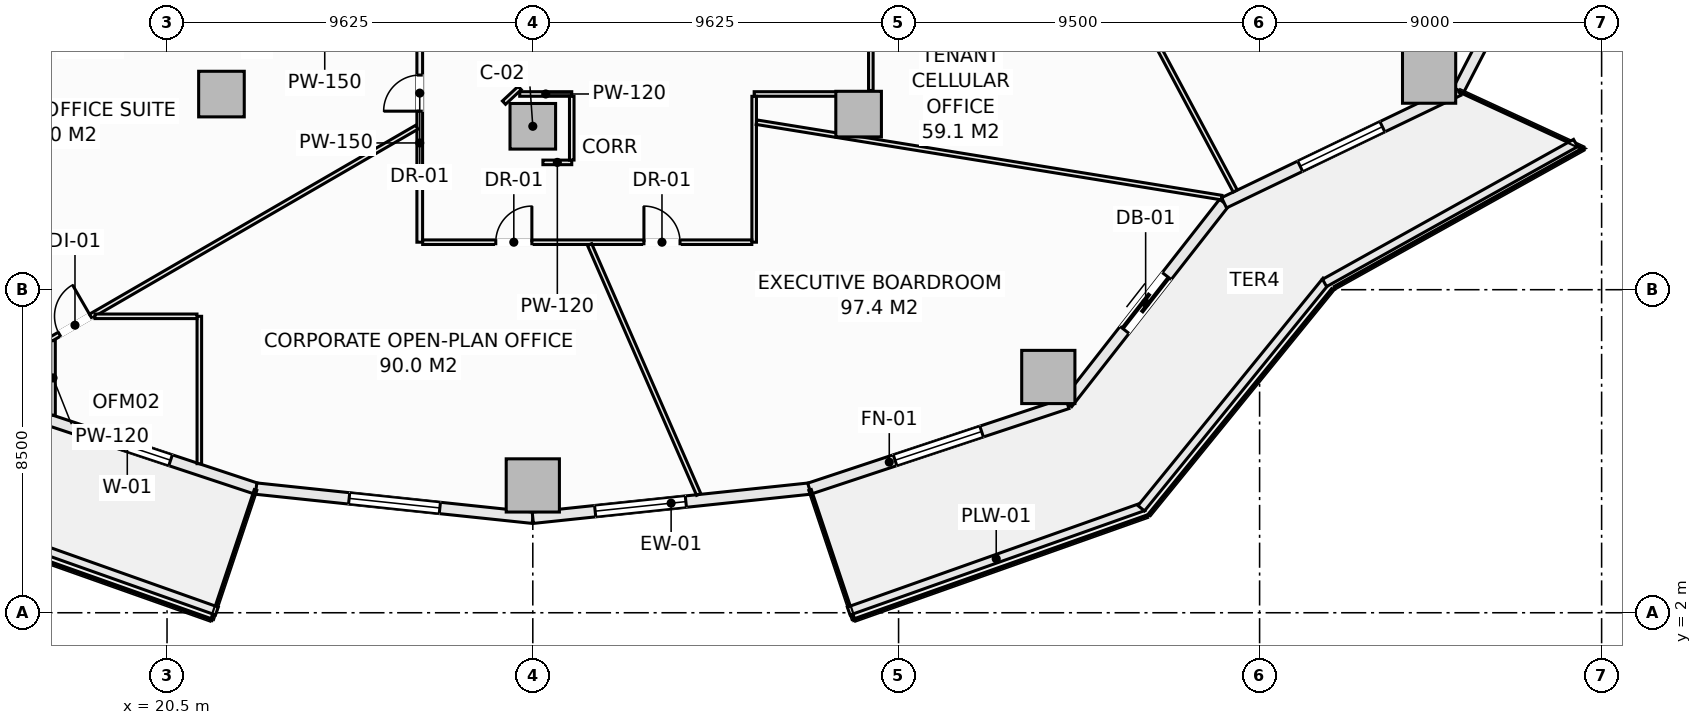
"""IFC4 building model, lengths in metres.
Left out: names, types, materials, properties, quantities, classifications, styles, units other than length and angle.
Written with IfcOpenShell. Run it as: python <this file> out.ifc"""

import sys

from ifc_helpers import new_model, si_unit, direction, frame, frame_2d, origin, origin_2d, place, context, subcontext, project, spatial, rectangle, extrude, element, fill, save


model = new_model("IFC4")
c1 = context("Model", 3, precision=1e-05, world=origin(), true_north=direction((0.0, 1.0)))
c2 = subcontext(c1, "Body", "Model", "MODEL_VIEW")
j1 = project(units=[si_unit("LENGTHUNIT", "METRE"), si_unit("PLANEANGLEUNIT", "RADIAN")], contexts=[c1])
p1 = place(None, origin())
s1 = spatial("IfcSite", under=j1, at=p1, CompositionType="ELEMENT")
p2 = place(p1, origin())
s2 = spatial("IfcBuilding", under=s1, at=p2, CompositionType="ELEMENT")
p3 = place(p2, frame((0.0, 0.0, 26.5)))
s3 = spatial("IfcBuildingStorey", under=s2, at=p3, CompositionType="ELEMENT", Elevation=26.5)
for number, where, z_axis, x_axis in (
    (1, (30.125, 5.35, -0.28), (0.0, 0.0, 1.0), (1.0, 0.0, 0.0)),
    (2, (43.69, 8.204, -0.28), (0.0, 0.0, 1.0), (1.0, 0.0, 0.0)),
    (3, (53.71, 16.106, -0.28), (0.0, 0.0, 1.0), (1.0, 0.0, 0.0)),
):
    element("IfcColumn", number, at=place(p3, frame(where, z_axis=z_axis, x_axis=x_axis)), inside=s3, PredefinedType="COLUMN", context=c2, shape_type="SweptSolid", body=[
        extrude(rectangle(XDim=1.4, YDim=1.4, at=origin_2d()), origin(), (0.0, 0.0, 1.0), 3.85),
    ])
for number, where, z_axis, x_axis in (
    (4, (21.932, 15.648, -0.28), (0.0, 0.0, 1.0), (1.0, 0.0, 0.0)),
    (5, (30.125, 14.8, -0.28), (0.0, 0.0, 1.0), (1.0, 0.0, 0.0)),
    (6, (38.698, 15.121, -0.28), (0.0, 0.0, 1.0), (1.0, 0.0, 0.0)),
):
    element("IfcColumn", number, at=place(p3, frame(where, z_axis=z_axis, x_axis=x_axis)), inside=s3, PredefinedType="COLUMN", context=c2, shape_type="SweptSolid", body=[
        extrude(rectangle(XDim=1.2, YDim=1.2, at=origin_2d()), origin(), (0.0, 0.0, 1.0), 3.85),
    ])
p4 = place(p3, frame((16.062, 7.514, 0.0), z_axis=(0.0, 0.0, 1.0), x_axis=(0.949238715533, -0.31455661006, 0.0)))
e7 = element("IfcWall", 7, at=p4, inside=s3, PredefinedType="SOLIDWALL", context=c2, shape_type="SweptSolid", body=[
    extrude(rectangle(XDim=7.146, YDim=0.3, at=frame_2d((3.573, 0.0))), origin(), (0.0, 0.0, 1.0), 3.093),
])
p5 = place(p4, frame((2.373, 0.0, 0.85)))
e8 = element("IfcOpeningElement", 8, at=p5, cuts=e7, PredefinedType="OPENING", context=c2, shape_type="SweptSolid", body=[
    extrude(rectangle(XDim=2.4, YDim=1.9, at=frame_2d((1.2, 0.95))), frame((0.0, 0.16, 0.0), z_axis=(0.0, -1.0, 0.0), x_axis=(1.0, 0.0, 0.0)), (0.0, 0.0, 1.0), 0.32),
])
p6 = place(p3, frame((22.846, 5.267, 0.0), z_axis=(0.0, 0.0, 1.0), x_axis=(0.994500334317, -0.104733399844, 0.0)))
e9 = element("IfcWall", 9, at=p6, inside=s3, PredefinedType="SOLIDWALL", context=c2, shape_type="SweptSolid", body=[
    extrude(rectangle(XDim=7.32, YDim=0.3, at=frame_2d((3.66, 0.0))), origin(), (0.0, 0.0, 1.0), 3.093),
])
p7 = place(p6, frame((2.46, 0.0, 0.85)))
e10 = element("IfcOpeningElement", 10, at=p7, cuts=e9, PredefinedType="OPENING", context=c2, shape_type="SweptSolid", body=[
    extrude(rectangle(XDim=2.4, YDim=1.9, at=frame_2d((1.2, 0.95))), frame((0.0, 0.16, 0.0), z_axis=(0.0, -1.0, 0.0), x_axis=(1.0, 0.0, 0.0)), (0.0, 0.0, 1.0), 0.32),
])
p8 = place(p3, frame((30.125, 4.5, 0.0), z_axis=(0.0, 0.0, 1.0), x_axis=(0.994500334317, 0.104733399844, 0.0)))
e11 = element("IfcWall", 11, at=p8, inside=s3, PredefinedType="SOLIDWALL", context=c2, shape_type="SweptSolid", body=[
    extrude(rectangle(XDim=7.32, YDim=0.3, at=frame_2d((3.66, 0.0))), origin(), (0.0, 0.0, 1.0), 3.093),
])
p9 = place(p8, frame((1.65, 0.0, 0.85)))
e12 = element("IfcOpeningElement", 12, at=p9, cuts=e11, PredefinedType="OPENING", context=c2, shape_type="SweptSolid", body=[
    extrude(rectangle(XDim=2.4, YDim=1.9, at=frame_2d((1.2, 0.95))), frame((0.0, 0.16, 0.0), z_axis=(0.0, -1.0, 0.0), x_axis=(1.0, 0.0, 0.0)), (0.0, 0.0, 1.0), 0.32),
])
p10 = place(p3, frame((37.404, 5.267, 0.0), z_axis=(0.0, 0.0, 1.0), x_axis=(0.949238715533, 0.31455661006, 0.0)))
e13 = element("IfcWall", 13, at=p10, inside=s3, PredefinedType="SOLIDWALL", context=c2, shape_type="SweptSolid", body=[
    extrude(rectangle(XDim=7.146, YDim=0.3, at=frame_2d((3.573, 0.0))), origin(), (0.0, 0.0, 1.0), 3.093),
])
p11 = place(p10, frame((2.373, 0.0, 0.85)))
e14 = element("IfcOpeningElement", 14, at=p11, cuts=e13, PredefinedType="OPENING", context=c2, shape_type="SweptSolid", body=[
    extrude(rectangle(XDim=2.4, YDim=1.9, at=frame_2d((1.2, 0.95))), frame((0.0, 0.16, 0.0), z_axis=(0.0, -1.0, 0.0), x_axis=(1.0, 0.0, 0.0)), (0.0, 0.0, 1.0), 0.32),
])
p12 = place(p3, frame((44.188, 7.514, 0.0), z_axis=(0.0, 0.0, 1.0), x_axis=(0.616421309777, 0.787416515482, 0.0)))
e15 = element("IfcWall", 15, at=p12, inside=s3, PredefinedType="SOLIDWALL", context=c2, shape_type="SweptSolid", body=[
    extrude(rectangle(XDim=6.696, YDim=0.3, at=frame_2d((3.348, 0.0))), origin(), (0.0, 0.0, 1.0), 3.093),
])
p13 = place(p12, frame((2.448, 0.0, 0.0)))
e16 = element("IfcOpeningElement", 16, at=p13, cuts=e15, PredefinedType="OPENING", context=c2, shape_type="SweptSolid", body=[
    extrude(rectangle(XDim=1.8, YDim=2.25, at=frame_2d((0.9, 1.125))), frame((0.0, 0.16, 0.0), z_axis=(0.0, -1.0, 0.0), x_axis=(1.0, 0.0, 0.0)), (0.0, 0.0, 1.0), 0.32),
])
p14 = place(p3, frame((48.315, 12.787, 0.0), z_axis=(0.0, 0.0, 1.0), x_axis=(0.901360393999, 0.433069786673, 0.0)))
e17 = element("IfcWall", 17, at=p14, inside=s3, PredefinedType="SOLIDWALL", context=c2, shape_type="SweptSolid", body=[
    extrude(rectangle(XDim=6.842, YDim=0.3, at=frame_2d((3.421, 0.0))), origin(), (0.0, 0.0, 1.0), 3.093),
])
p15 = place(p14, frame((2.221, 0.0, 0.85)))
e18 = element("IfcOpeningElement", 18, at=p15, cuts=e17, PredefinedType="OPENING", context=c2, shape_type="SweptSolid", body=[
    extrude(rectangle(XDim=2.4, YDim=1.9, at=frame_2d((1.2, 0.95))), frame((0.0, 0.16, 0.0), z_axis=(0.0, -1.0, 0.0), x_axis=(1.0, 0.0, 0.0)), (0.0, 0.0, 1.0), 0.32),
])
p16 = place(p3, frame((54.482, 15.75, 0.0), z_axis=(0.0, 0.0, 1.0), x_axis=(0.459809804413, 0.88801742312, 0.0)))
e19 = element("IfcWall", 19, at=p16, inside=s3, PredefinedType="SOLIDWALL", context=c2, shape_type="SweptSolid", body=[
    extrude(rectangle(XDim=6.111, YDim=0.3, at=frame_2d((3.055, 0.0))), origin(), (0.0, 0.0, 1.0), 3.093),
])
p17 = place(p16, frame((1.855, 0.0, 0.85)))
e20 = element("IfcOpeningElement", 20, at=p17, cuts=e19, PredefinedType="OPENING", context=c2, shape_type="SweptSolid", body=[
    extrude(rectangle(XDim=2.4, YDim=1.9, at=frame_2d((1.2, 0.95))), frame((0.0, 0.16, 0.0), z_axis=(0.0, -1.0, 0.0), x_axis=(1.0, 0.0, 0.0)), (0.0, 0.0, 1.0), 0.32),
])
for number, where, z_axis, x_axis in (
    (21, (14.049, 4.795, 0.0), (0.0, 0.0, 1.0), (0.943, -0.334, 0.0)),
    (22, (38.438, 2.045, 0.0), (0.0, 0.0, 1.0), (0.943, 0.334, 0.0)),
):
    element("IfcWall", number, at=place(p3, frame(where, z_axis=z_axis, x_axis=x_axis)), inside=s3, PredefinedType="PARAPET", context=c2, shape_type="SweptSolid", body=[
        extrude(rectangle(XDim=8.236, YDim=0.22, at=frame_2d((4.118, 0.0))), origin(), (0.0, 0.0, 1.0), 0.52),
    ])
p18 = place(p3, frame((46.136, 4.749, 0.0), z_axis=(0.0, 0.0, 1.0), x_axis=(0.630997450658, 0.775784903993, 0.0)))
e23 = element("IfcWall", 23, at=p18, inside=s3, PredefinedType="PARAPET", context=c2, shape_type="SweptSolid", body=[
    extrude(rectangle(XDim=7.718, YDim=0.22, at=frame_2d((3.859, 0.0))), origin(), (0.0, 0.0, 1.0), 0.52),
])
p19 = place(p3, frame((50.959, 10.678, 0.0), z_axis=(0.0, 0.0, 1.0), x_axis=(0.873500119739, 0.48682393205, 0.0)))
e24 = element("IfcWall", 24, at=p19, inside=s3, PredefinedType="PARAPET", context=c2, shape_type="SweptSolid", body=[
    extrude(rectangle(XDim=7.562, YDim=0.22, at=frame_2d((3.781, 0.0))), origin(), (0.0, 0.0, 1.0), 0.52),
])
p20 = place(p3, frame((27.15, 11.75, 0.0), z_axis=(0.0, 0.0, 1.0), x_axis=(0.0, 1.0, 0.0)))
e25 = element("IfcWall", 25, at=p20, inside=s3, PredefinedType="PARTITIONING", context=c2, shape_type="SweptSolid", body=[
    extrude(rectangle(XDim=5.223, YDim=0.15, at=frame_2d((2.611, 0.0))), origin(), (0.0, 0.0, 1.0), 3.57),
])
p21 = place(p20, frame((3.448, 0.0, 0.0)))
e26 = element("IfcOpeningElement", 26, at=p21, cuts=e25, PredefinedType="OPENING", context=c2, shape_type="SweptSolid", body=[
    extrude(rectangle(XDim=0.95, YDim=2.1, at=frame_2d((0.475, 1.05))), frame((0.0, 0.085, 0.0), z_axis=(0.0, -1.0, 0.0), x_axis=(1.0, 0.0, 0.0)), (0.0, 0.0, 1.0), 0.17),
])
p22 = place(p3, frame((29.78, 15.65, 0.0), z_axis=(0.0, 0.0, 1.0), x_axis=(1.0, 0.0, 0.0)))
e27 = element("IfcWall", 27, at=p22, inside=s3, PredefinedType="PARTITIONING", context=c2, shape_type="SweptSolid", body=[
    extrude(rectangle(XDim=1.37, YDim=0.12, at=frame_2d((0.685, 0.0))), origin(), (0.0, 0.0, 1.0), 3.57),
])
p23 = place(p3, frame((35.95, 15.65, 0.0), z_axis=(0.0, 0.0, 1.0), x_axis=(1.0, 0.0, 0.0)))
e28 = element("IfcWall", 28, at=p23, inside=s3, PredefinedType="PARTITIONING", context=c2, shape_type="SweptSolid", body=[
    extrude(rectangle(XDim=2.291, YDim=0.12, at=frame_2d((1.146, 0.0))), origin(), (0.0, 0.0, 1.0), 3.57),
])
p24 = place(p3, frame((35.95, 11.75, 0.0), z_axis=(0.0, 0.0, 1.0), x_axis=(0.0, 1.0, 0.0)))
e29 = element("IfcWall", 29, at=p24, inside=s3, PredefinedType="PARTITIONING", context=c2, shape_type="SweptSolid", body=[
    extrude(rectangle(XDim=3.838, YDim=0.12, at=frame_2d((1.919, 0.0))), origin(), (0.0, 0.0, 1.0), 3.57),
])
p25 = place(p3, frame((27.227, 11.75, 0.0), z_axis=(0.0, 0.0, 1.0), x_axis=(1.0, 0.0, 0.0)))
e30 = element("IfcWall", 30, at=p25, inside=s3, PredefinedType="PARTITIONING", context=c2, shape_type="SweptSolid", body=[
    extrude(rectangle(XDim=8.661, YDim=0.12, at=frame_2d((4.331, 0.0))), origin(), (0.0, 0.0, 1.0), 3.57),
])
p26 = place(p25, frame((1.923, 0.0, 0.0)))
e31 = element("IfcOpeningElement", 31, at=p26, cuts=e30, PredefinedType="OPENING", context=c2, shape_type="SweptSolid", body=[
    extrude(rectangle(XDim=0.95, YDim=2.1, at=frame_2d((0.475, 1.05))), frame((0.0, 0.07, 0.0), z_axis=(0.0, -1.0, 0.0), x_axis=(1.0, 0.0, 0.0)), (0.0, 0.0, 1.0), 0.14),
])
p27 = place(p25, frame((5.822, 0.0, 0.0)))
e32 = element("IfcOpeningElement", 32, at=p27, cuts=e30, PredefinedType="OPENING", context=c2, shape_type="SweptSolid", body=[
    extrude(rectangle(XDim=0.95, YDim=2.1, at=frame_2d((0.475, 1.05))), frame((0.0, 0.07, 0.0), z_axis=(0.0, -1.0, 0.0), x_axis=(1.0, 0.0, 0.0)), (0.0, 0.0, 1.0), 0.14),
])
p28 = place(p3, frame((39.02, 15.742, 0.0), z_axis=(0.0, 0.0, 1.0), x_axis=(0.0, 1.0, 0.0)))
e33 = element("IfcWall", 33, at=p28, inside=s3, PredefinedType="PARTITIONING", context=c2, shape_type="SweptSolid", body=[
    extrude(rectangle(XDim=1.268, YDim=0.12, at=frame_2d((0.634, 0.0))), origin(), (0.0, 0.0, 1.0), 2.934),
])
p29 = place(p3, frame((29.367, 15.422, 0.0), z_axis=(0.0, 0.0, 1.0), x_axis=(0.730667420492, 0.682733564893, 0.0)))
e34 = element("IfcWall", 34, at=p29, inside=s3, PredefinedType="PARTITIONING", context=c2, shape_type="SweptSolid", body=[
    extrude(rectangle(XDim=0.565, YDim=0.12, at=frame_2d((0.283, 0.0))), origin(), (0.0, 0.0, 1.0), 3.57),
])
p30 = place(p3, frame((30.391, 13.85, 0.0), z_axis=(0.0, 0.0, 1.0), x_axis=(1.0, 0.0, 0.0)))
e35 = element("IfcWall", 35, at=p30, inside=s3, PredefinedType="PARTITIONING", context=c2, shape_type="SweptSolid", body=[
    extrude(rectangle(XDim=0.759, YDim=0.12, at=frame_2d((0.379, 0.0))), origin(), (0.0, 0.0, 1.0), 3.57),
])
p31 = place(p3, frame((31.15, 13.912, 0.0), z_axis=(0.0, 0.0, 1.0), x_axis=(0.0, 1.0, 0.0)))
e36 = element("IfcWall", 36, at=p31, inside=s3, PredefinedType="PARTITIONING", context=c2, shape_type="SweptSolid", body=[
    extrude(rectangle(XDim=1.676, YDim=0.12, at=frame_2d((0.838, 0.0))), origin(), (0.0, 0.0, 1.0), 3.57),
])
p32 = place(p3, frame((15.719, 8.2, 0.0), z_axis=(0.0, 0.0, 1.0), x_axis=(0.865375324019, 0.501124284563, 0.0)))
e37 = element("IfcWall", 37, at=p32, inside=s3, PredefinedType="PARTITIONING", context=c2, shape_type="SweptSolid", body=[
    extrude(rectangle(XDim=13.121, YDim=0.12, at=frame_2d((6.561, 0.0))), origin(), (0.0, 0.0, 1.0), 2.934),
])
p33 = place(p32, frame((2.251, 0.0, 0.0)))
e38 = element("IfcOpeningElement", 38, at=p33, cuts=e37, PredefinedType="OPENING", context=c2, shape_type="SweptSolid", body=[
    extrude(rectangle(XDim=0.95, YDim=2.1, at=frame_2d((0.475, 1.05))), frame((0.0, 0.07, 0.0), z_axis=(0.0, -1.0, 0.0), x_axis=(1.0, 0.0, 0.0)), (0.0, 0.0, 1.0), 0.14),
])
p34 = place(p3, frame((21.35, 5.922, 0.0), z_axis=(0.0, 0.0, 1.0), x_axis=(0.0, 1.0, 0.0)))
e39 = element("IfcWall", 39, at=p34, inside=s3, PredefinedType="PARTITIONING", context=c2, shape_type="SweptSolid", body=[
    extrude(rectangle(XDim=3.878, YDim=0.12, at=frame_2d((1.939, 0.0))), origin(), (0.0, 0.0, 1.0), 3.57),
])
p35 = place(p3, frame((18.605, 9.8, 0.0), z_axis=(0.0, 0.0, 1.0), x_axis=(1.0, 0.0, 0.0)))
e40 = element("IfcWall", 40, at=p35, inside=s3, PredefinedType="PARTITIONING", context=c2, shape_type="SweptSolid", body=[
    extrude(rectangle(XDim=2.683, YDim=0.12, at=frame_2d((1.342, 0.0))), origin(), (0.0, 0.0, 1.0), 3.57),
])
p36 = place(p3, frame((31.619, 11.688, 0.0), z_axis=(0.0, 0.0, 1.0), x_axis=(0.400197544586, -0.916428898119, 0.0)))
e41 = element("IfcWall", 41, at=p36, inside=s3, PredefinedType="PARTITIONING", context=c2, shape_type="SweptSolid", body=[
    extrude(rectangle(XDim=7.175, YDim=0.12, at=frame_2d((3.587, 0.0))), origin(), (0.0, 0.0, 1.0), 3.57),
])
p37 = place(p3, frame((17.5, 7.198, 0.0), z_axis=(0.0, 0.0, 1.0), x_axis=(0.0, 1.0, 0.0)))
e42 = element("IfcWall", 42, at=p37, inside=s3, PredefinedType="PARTITIONING", context=c2, shape_type="SweptSolid", body=[
    extrude(rectangle(XDim=1.962, YDim=0.12, at=frame_2d((0.981, 0.0))), origin(), (0.0, 0.0, 1.0), 2.934),
])
p38 = place(p3, frame((36.012, 14.908, 0.0), z_axis=(0.0, 0.0, 1.0), x_axis=(0.987115987943, -0.16000633221, 0.0)))
e43 = element("IfcWall", 43, at=p38, inside=s3, PredefinedType="PARTITIONING", context=c2, shape_type="SweptSolid", body=[
    extrude(rectangle(XDim=12.397, YDim=0.12, at=frame_2d((6.199, 0.0))), origin(), (0.0, 0.0, 1.0), 2.934),
])
p39 = place(p3, frame((46.347, 17.338, 0.0), z_axis=(0.0, 0.0, 1.0), x_axis=(0.470506505613, -0.882396525478, 0.0)))
e44 = element("IfcWall", 44, at=p39, inside=s3, PredefinedType="PARTITIONING", context=c2, shape_type="SweptSolid", body=[
    extrude(rectangle(XDim=4.806, YDim=0.12, at=frame_2d((2.403, 0.0))), origin(), (0.0, 0.0, 1.0), 3.57),
])
p40 = place(p5, origin())
e45 = element("IfcWindow", 45, at=p40, inside=s3, PartitioningType="SINGLE_PANEL", PredefinedType="WINDOW", context=c2, shape_type="SweptSolid", body=[
    extrude(rectangle(XDim=2.4, YDim=1.9, at=frame_2d((1.2, 0.95))), frame((0.0, 0.03, 0.0), z_axis=(0.0, -1.0, 0.0), x_axis=(1.0, 0.0, 0.0)), (0.0, 0.0, 1.0), 0.06),
])
fill(e8, e45)
p41 = place(p7, origin())
e46 = element("IfcWindow", 46, at=p41, inside=s3, PartitioningType="SINGLE_PANEL", PredefinedType="WINDOW", context=c2, shape_type="SweptSolid", body=[
    extrude(rectangle(XDim=2.4, YDim=1.9, at=frame_2d((1.2, 0.95))), frame((0.0, 0.03, 0.0), z_axis=(0.0, -1.0, 0.0), x_axis=(1.0, 0.0, 0.0)), (0.0, 0.0, 1.0), 0.06),
])
fill(e10, e46)
p42 = place(p9, origin())
e47 = element("IfcWindow", 47, at=p42, inside=s3, PartitioningType="SINGLE_PANEL", PredefinedType="WINDOW", context=c2, shape_type="SweptSolid", body=[
    extrude(rectangle(XDim=2.4, YDim=1.9, at=frame_2d((1.2, 0.95))), frame((0.0, 0.03, 0.0), z_axis=(0.0, -1.0, 0.0), x_axis=(1.0, 0.0, 0.0)), (0.0, 0.0, 1.0), 0.06),
])
fill(e12, e47)
p43 = place(p11, origin())
e48 = element("IfcWindow", 48, at=p43, inside=s3, PartitioningType="SINGLE_PANEL", PredefinedType="WINDOW", context=c2, shape_type="SweptSolid", body=[
    extrude(rectangle(XDim=2.4, YDim=1.9, at=frame_2d((1.2, 0.95))), frame((0.0, 0.03, 0.0), z_axis=(0.0, -1.0, 0.0), x_axis=(1.0, 0.0, 0.0)), (0.0, 0.0, 1.0), 0.06),
])
fill(e14, e48)
p44 = place(p13, frame((1.8, 0.0, 0.0), z_axis=(0.0, 0.0, 1.0), x_axis=(-1.0, 0.0, 0.0)))
e49 = element("IfcDoor", 49, at=p44, inside=s3, OperationType="SLIDING_TO_LEFT", PredefinedType="DOOR", context=c2, shape_type="SweptSolid", body=[
    extrude(rectangle(XDim=1.8, YDim=2.25, at=frame_2d((0.9, 1.125))), frame((0.0, 0.025, 0.0), z_axis=(0.0, -1.0, 0.0), x_axis=(1.0, 0.0, 0.0)), (0.0, 0.0, 1.0), 0.05),
])
fill(e16, e49)
p45 = place(p15, origin())
e50 = element("IfcWindow", 50, at=p45, inside=s3, PartitioningType="SINGLE_PANEL", PredefinedType="WINDOW", context=c2, shape_type="SweptSolid", body=[
    extrude(rectangle(XDim=2.4, YDim=1.9, at=frame_2d((1.2, 0.95))), frame((0.0, 0.03, 0.0), z_axis=(0.0, -1.0, 0.0), x_axis=(1.0, 0.0, 0.0)), (0.0, 0.0, 1.0), 0.06),
])
fill(e18, e50)
p46 = place(p21, origin())
e51 = element("IfcDoor", 51, at=p46, inside=s3, OperationType="SINGLE_SWING_LEFT", PredefinedType="DOOR", context=c2, shape_type="SweptSolid", body=[
    extrude(rectangle(XDim=0.95, YDim=2.1, at=frame_2d((0.475, 1.05))), frame((0.0, 0.025, 0.0), z_axis=(0.0, -1.0, 0.0), x_axis=(1.0, 0.0, 0.0)), (0.0, 0.0, 1.0), 0.05),
])
fill(e26, e51)
p47 = place(p26, origin())
e52 = element("IfcDoor", 52, at=p47, inside=s3, OperationType="SINGLE_SWING_RIGHT", PredefinedType="DOOR", context=c2, shape_type="SweptSolid", body=[
    extrude(rectangle(XDim=0.95, YDim=2.1, at=frame_2d((0.475, 1.05))), frame((0.0, 0.025, 0.0), z_axis=(0.0, -1.0, 0.0), x_axis=(1.0, 0.0, 0.0)), (0.0, 0.0, 1.0), 0.05),
])
fill(e31, e52)
p48 = place(p27, origin())
e53 = element("IfcDoor", 53, at=p48, inside=s3, OperationType="SINGLE_SWING_LEFT", PredefinedType="DOOR", context=c2, shape_type="SweptSolid", body=[
    extrude(rectangle(XDim=0.95, YDim=2.1, at=frame_2d((0.475, 1.05))), frame((0.0, 0.025, 0.0), z_axis=(0.0, -1.0, 0.0), x_axis=(1.0, 0.0, 0.0)), (0.0, 0.0, 1.0), 0.05),
])
fill(e32, e53)
p49 = place(p33, origin())
e54 = element("IfcDoor", 54, at=p49, inside=s3, OperationType="SINGLE_SWING_RIGHT", PredefinedType="DOOR", context=c2, shape_type="SweptSolid", body=[
    extrude(rectangle(XDim=0.95, YDim=2.1, at=frame_2d((0.475, 1.05))), frame((0.0, 0.025, 0.0), z_axis=(0.0, -1.0, 0.0), x_axis=(1.0, 0.0, 0.0)), (0.0, 0.0, 1.0), 0.05),
])
fill(e38, e54)
save(model, sys.argv[1])
